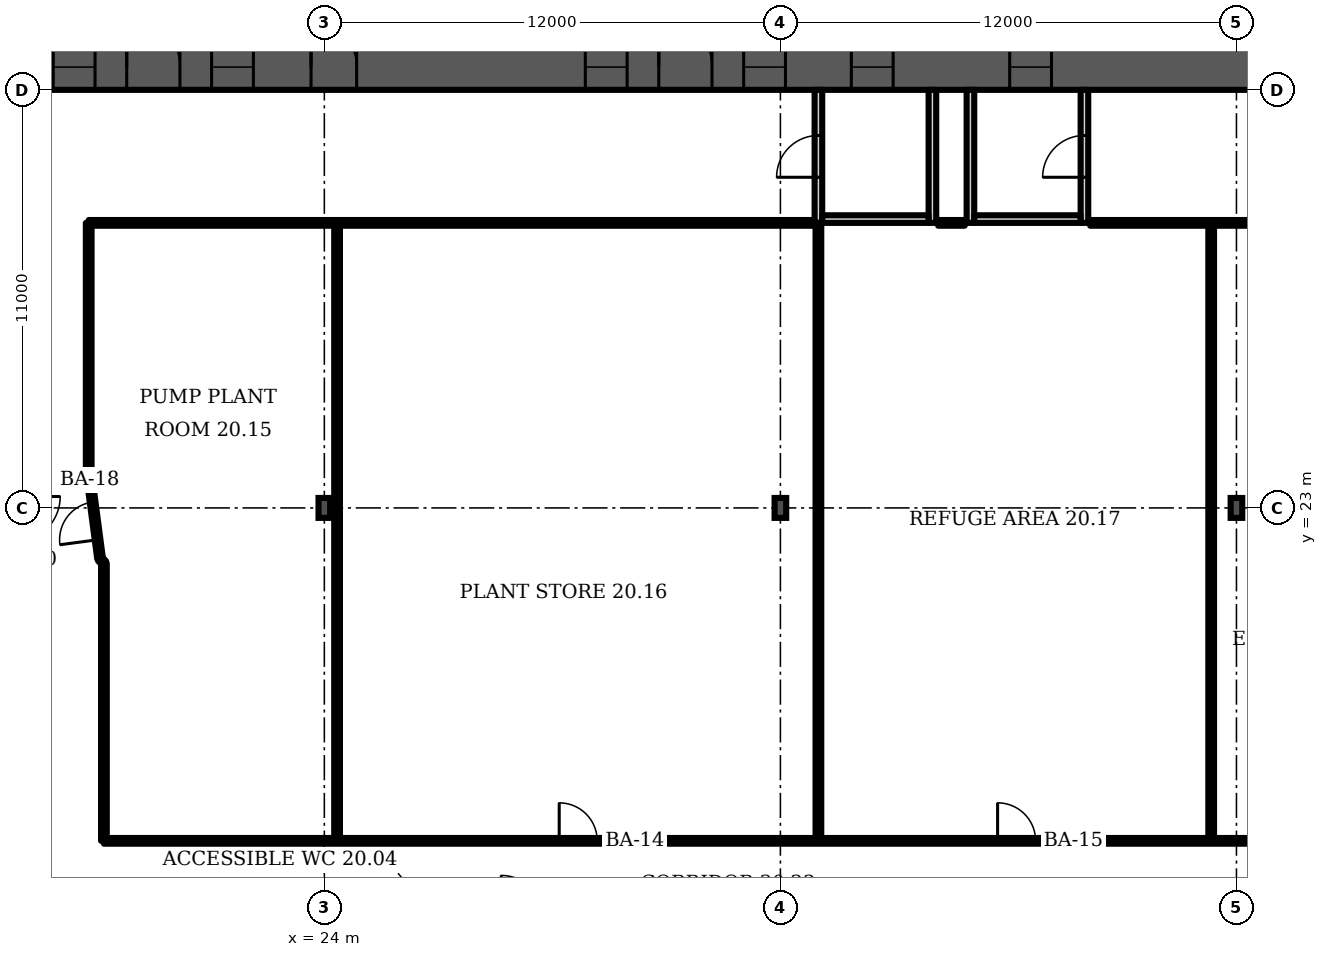
"""IFC4 building model, lengths in metres.
Left out: names, types, materials, properties, quantities, classifications, styles, units other than length and angle.
Written with IfcOpenShell. Run it as: python <this file> out.ifc"""

import sys

from ifc_helpers import new_model, si_unit, direction, frame, frame_2d, origin, origin_2d, place, context, subcontext, project, spatial, rectangle, i_section, extrude, element, fill, save


model = new_model("IFC4")
c1 = context("Model", 3, precision=1e-05, world=origin(), true_north=direction((0.0, 1.0)))
c2 = subcontext(c1, "Body", "Model", "MODEL_VIEW")
j1 = project(units=[si_unit("LENGTHUNIT", "METRE"), si_unit("PLANEANGLEUNIT", "RADIAN")], contexts=[c1])
p1 = place(None, origin())
s1 = spatial("IfcSite", under=j1, at=p1, CompositionType="ELEMENT")
p2 = place(p1, origin())
s2 = spatial("IfcBuilding", under=s1, at=p2, CompositionType="ELEMENT")
p3 = place(p2, frame((0.0, 0.0, 91.9)))
s3 = spatial("IfcBuildingStorey", under=s2, at=p3, CompositionType="ELEMENT", Elevation=91.9)
p4 = place(p3, frame((9.0, 34.6, 0.0), z_axis=(0.0, 0.0, 1.0), x_axis=(1.0, 0.0, 0.0)))
e1 = element("IfcWall", 1, at=p4, inside=s3, PredefinedType="SHEAR", context=c2, shape_type="SweptSolid", body=[
    extrude(rectangle(XDim=56.0, YDim=1.2, at=frame_2d((28.0, 0.0))), origin(), (0.0, 0.0, 1.0), 4.8),
])
p5 = place(p4, frame((3.3, 0.0, 0.0)))
e2 = element("IfcOpeningElement", 2, at=p5, cuts=e1, PredefinedType="OPENING", context=c2, shape_type="SweptSolid", body=[
    extrude(rectangle(XDim=1.0, YDim=2.1, at=frame_2d((0.5, 1.05))), frame((0.0, 0.61, 0.0), z_axis=(0.0, -1.0, 0.0), x_axis=(1.0, 0.0, 0.0)), (0.0, 0.0, 1.0), 1.22),
])
p6 = place(p4, frame((7.867, 0.0, 0.0)))
e3 = element("IfcOpeningElement", 3, at=p6, cuts=e1, PredefinedType="OPENING", context=c2, shape_type="SweptSolid", body=[
    extrude(rectangle(XDim=1.1, YDim=2.1, at=frame_2d((0.55, 1.05))), frame((0.0, 0.61, 0.0), z_axis=(0.0, -1.0, 0.0), x_axis=(1.0, 0.0, 0.0)), (0.0, 0.0, 1.0), 1.22),
])
p7 = place(p4, frame((12.033, 0.0, 0.0)))
e4 = element("IfcOpeningElement", 4, at=p7, cuts=e1, PredefinedType="OPENING", context=c2, shape_type="SweptSolid", body=[
    extrude(rectangle(XDim=1.1, YDim=2.1, at=frame_2d((0.55, 1.05))), frame((0.0, 0.61, 0.0), z_axis=(0.0, -1.0, 0.0), x_axis=(1.0, 0.0, 0.0)), (0.0, 0.0, 1.0), 1.22),
])
p8 = place(p4, frame((9.8, 0.0, 0.0)))
e5 = element("IfcOpeningElement", 5, at=p8, cuts=e1, PredefinedType="OPENING", context=c2, shape_type="SweptSolid", body=[
    extrude(rectangle(XDim=1.4, YDim=2.1, at=frame_2d((0.7, 1.05))), frame((0.0, 0.61, 0.0), z_axis=(0.0, -1.0, 0.0), x_axis=(1.0, 0.0, 0.0)), (0.0, 0.0, 1.0), 1.22),
])
p9 = place(p4, frame((14.65, 0.0, 0.0)))
e6 = element("IfcOpeningElement", 6, at=p9, cuts=e1, PredefinedType="OPENING", context=c2, shape_type="SweptSolid", body=[
    extrude(rectangle(XDim=1.2, YDim=2.1, at=frame_2d((0.6, 1.05))), frame((0.0, 0.61, 0.0), z_axis=(0.0, -1.0, 0.0), x_axis=(1.0, 0.0, 0.0)), (0.0, 0.0, 1.0), 1.22),
])
p10 = place(p4, frame((21.867, 0.0, 0.0)))
e7 = element("IfcOpeningElement", 7, at=p10, cuts=e1, PredefinedType="OPENING", context=c2, shape_type="SweptSolid", body=[
    extrude(rectangle(XDim=1.1, YDim=2.1, at=frame_2d((0.55, 1.05))), frame((0.0, 0.61, 0.0), z_axis=(0.0, -1.0, 0.0), x_axis=(1.0, 0.0, 0.0)), (0.0, 0.0, 1.0), 1.22),
])
p11 = place(p4, frame((26.033, 0.0, 0.0)))
e8 = element("IfcOpeningElement", 8, at=p11, cuts=e1, PredefinedType="OPENING", context=c2, shape_type="SweptSolid", body=[
    extrude(rectangle(XDim=1.1, YDim=2.1, at=frame_2d((0.55, 1.05))), frame((0.0, 0.61, 0.0), z_axis=(0.0, -1.0, 0.0), x_axis=(1.0, 0.0, 0.0)), (0.0, 0.0, 1.0), 1.22),
])
p12 = place(p4, frame((23.8, 0.0, 0.0)))
e9 = element("IfcOpeningElement", 9, at=p12, cuts=e1, PredefinedType="OPENING", context=c2, shape_type="SweptSolid", body=[
    extrude(rectangle(XDim=1.4, YDim=2.1, at=frame_2d((0.7, 1.05))), frame((0.0, 0.61, 0.0), z_axis=(0.0, -1.0, 0.0), x_axis=(1.0, 0.0, 0.0)), (0.0, 0.0, 1.0), 1.22),
])
p13 = place(p4, frame((28.867, 0.0, 0.0)))
e10 = element("IfcOpeningElement", 10, at=p13, cuts=e1, PredefinedType="OPENING", context=c2, shape_type="SweptSolid", body=[
    extrude(rectangle(XDim=1.1, YDim=2.1, at=frame_2d((0.55, 1.05))), frame((0.0, 0.61, 0.0), z_axis=(0.0, -1.0, 0.0), x_axis=(1.0, 0.0, 0.0)), (0.0, 0.0, 1.0), 1.22),
])
p14 = place(p4, frame((33.033, 0.0, 0.0)))
e11 = element("IfcOpeningElement", 11, at=p14, cuts=e1, PredefinedType="OPENING", context=c2, shape_type="SweptSolid", body=[
    extrude(rectangle(XDim=1.1, YDim=2.1, at=frame_2d((0.55, 1.05))), frame((0.0, 0.61, 0.0), z_axis=(0.0, -1.0, 0.0), x_axis=(1.0, 0.0, 0.0)), (0.0, 0.0, 1.0), 1.22),
])
p15 = place(p4, frame((40.15, 0.0, 0.0)))
e12 = element("IfcOpeningElement", 12, at=p15, cuts=e1, PredefinedType="OPENING", context=c2, shape_type="SweptSolid", body=[
    extrude(rectangle(XDim=1.2, YDim=2.1, at=frame_2d((0.6, 1.05))), frame((0.0, 0.61, 0.0), z_axis=(0.0, -1.0, 0.0), x_axis=(1.0, 0.0, 0.0)), (0.0, 0.0, 1.0), 1.22),
])
p16 = place(p4, frame((44.8, 0.0, 0.0)))
e13 = element("IfcOpeningElement", 13, at=p16, cuts=e1, PredefinedType="OPENING", context=c2, shape_type="SweptSolid", body=[
    extrude(rectangle(XDim=1.4, YDim=2.1, at=frame_2d((0.7, 1.05))), frame((0.0, 0.61, 0.0), z_axis=(0.0, -1.0, 0.0), x_axis=(1.0, 0.0, 0.0)), (0.0, 0.0, 1.0), 1.22),
])
p17 = place(p4, frame((49.867, 0.0, 0.0)))
e14 = element("IfcOpeningElement", 14, at=p17, cuts=e1, PredefinedType="OPENING", context=c2, shape_type="SweptSolid", body=[
    extrude(rectangle(XDim=1.1, YDim=2.1, at=frame_2d((0.55, 1.05))), frame((0.0, 0.61, 0.0), z_axis=(0.0, -1.0, 0.0), x_axis=(1.0, 0.0, 0.0)), (0.0, 0.0, 1.0), 1.22),
])
p18 = place(p4, frame((53.5, 0.0, 0.0)))
e15 = element("IfcOpeningElement", 15, at=p18, cuts=e1, PredefinedType="OPENING", context=c2, shape_type="SweptSolid", body=[
    extrude(rectangle(XDim=1.1, YDim=2.1, at=frame_2d((0.55, 1.05))), frame((0.0, 0.61, 0.0), z_axis=(0.0, -1.0, 0.0), x_axis=(1.0, 0.0, 0.0)), (0.0, 0.0, 1.0), 1.22),
])
p19 = place(p4, frame((51.567, 0.0, 0.0)))
e16 = element("IfcOpeningElement", 16, at=p19, cuts=e1, PredefinedType="OPENING", context=c2, shape_type="SweptSolid", body=[
    extrude(rectangle(XDim=1.4, YDim=2.1, at=frame_2d((0.7, 1.05))), frame((0.0, 0.61, 0.0), z_axis=(0.0, -1.0, 0.0), x_axis=(1.0, 0.0, 0.0)), (0.0, 0.0, 1.0), 1.22),
])
for number, where, z_axis, x_axis in (
    (17, (24.0, 23.0, 0.0), (0.0, 0.0, 1.0), (1.0, 0.0, 0.0)),
    (18, (36.0, 23.0, 0.0), (0.0, 0.0, 1.0), (1.0, 0.0, 0.0)),
    (19, (48.0, 23.0, 0.0), (0.0, 0.0, 1.0), (1.0, 0.0, 0.0)),
):
    element("IfcColumn", number, at=place(p3, frame(where, z_axis=z_axis, x_axis=x_axis)), inside=s3, PredefinedType="COLUMN", context=c2, shape_type="SweptSolid", body=[
        extrude(i_section(OverallWidth=0.306, OverallDepth=0.524, WebThickness=0.021, FlangeThickness=0.04, FilletRadius=0.027, at=origin_2d()), origin(), (0.0, 0.0, 1.0), 4.8),
    ])
p20 = place(p3, frame((37.0, 30.5, 0.0), z_axis=(0.0, 0.0, 1.0), x_axis=(0.0, 1.0, 0.0)))
e20 = element("IfcWall", 20, at=p20, inside=s3, PredefinedType="PARTITIONING", context=c2, shape_type="SweptSolid", body=[
    extrude(rectangle(XDim=3.5, YDim=0.2, at=frame_2d((1.75, 0.0))), origin(), (0.0, 0.0, 1.0), 4.4),
])
p21 = place(p20, frame((1.2, 0.0, 0.0)))
e21 = element("IfcOpeningElement", 21, at=p21, cuts=e20, PredefinedType="OPENING", context=c2, shape_type="SweptSolid", body=[
    extrude(rectangle(XDim=1.1, YDim=2.1, at=frame_2d((0.55, 1.05))), frame((0.0, 0.11, 0.0), z_axis=(0.0, -1.0, 0.0), x_axis=(1.0, 0.0, 0.0)), (0.0, 0.0, 1.0), 0.22),
])
p22 = place(p3, frame((40.0, 30.5, 0.0), z_axis=(0.0, 0.0, 1.0), x_axis=(0.0, 1.0, 0.0)))
e22 = element("IfcWall", 22, at=p22, inside=s3, PredefinedType="PARTITIONING", context=c2, shape_type="SweptSolid", body=[
    extrude(rectangle(XDim=3.5, YDim=0.2, at=frame_2d((1.75, 0.0))), origin(), (0.0, 0.0, 1.0), 4.4),
])
p23 = place(p3, frame((37.1, 30.6, 0.0), z_axis=(0.0, 0.0, 1.0), x_axis=(1.0, 0.0, 0.0)))
e23 = element("IfcWall", 23, at=p23, inside=s3, PredefinedType="PARTITIONING", context=c2, shape_type="SweptSolid", body=[
    extrude(rectangle(XDim=2.8, YDim=0.2, at=frame_2d((1.4, 0.0))), origin(), (0.0, 0.0, 1.0), 4.4),
])
p24 = place(p3, frame((41.0, 30.5, 0.0), z_axis=(0.0, 0.0, 1.0), x_axis=(0.0, 1.0, 0.0)))
e24 = element("IfcWall", 24, at=p24, inside=s3, PredefinedType="PARTITIONING", context=c2, shape_type="SweptSolid", body=[
    extrude(rectangle(XDim=3.5, YDim=0.2, at=frame_2d((1.75, 0.0))), origin(), (0.0, 0.0, 1.0), 4.4),
])
p25 = place(p3, frame((44.0, 30.5, 0.0), z_axis=(0.0, 0.0, 1.0), x_axis=(0.0, 1.0, 0.0)))
e25 = element("IfcWall", 25, at=p25, inside=s3, PredefinedType="PARTITIONING", context=c2, shape_type="SweptSolid", body=[
    extrude(rectangle(XDim=3.5, YDim=0.2, at=frame_2d((1.75, 0.0))), origin(), (0.0, 0.0, 1.0), 4.4),
])
p26 = place(p25, frame((1.2, 0.0, 0.0)))
e26 = element("IfcOpeningElement", 26, at=p26, cuts=e25, PredefinedType="OPENING", context=c2, shape_type="SweptSolid", body=[
    extrude(rectangle(XDim=1.1, YDim=2.1, at=frame_2d((0.55, 1.05))), frame((0.0, 0.11, 0.0), z_axis=(0.0, -1.0, 0.0), x_axis=(1.0, 0.0, 0.0)), (0.0, 0.0, 1.0), 0.22),
])
p27 = place(p3, frame((41.1, 30.6, 0.0), z_axis=(0.0, 0.0, 1.0), x_axis=(1.0, 0.0, 0.0)))
e27 = element("IfcWall", 27, at=p27, inside=s3, PredefinedType="PARTITIONING", context=c2, shape_type="SweptSolid", body=[
    extrude(rectangle(XDim=2.8, YDim=0.2, at=frame_2d((1.4, 0.0))), origin(), (0.0, 0.0, 1.0), 4.4),
])
p28 = place(p3, frame((17.8, 23.935, 0.0), z_axis=(0.0, 0.0, 1.0), x_axis=(0.0, 1.0, 0.0)))
e28 = element("IfcWall", 28, at=p28, inside=s3, PredefinedType="PARTITIONING", context=c2, shape_type="SweptSolid", body=[
    extrude(rectangle(XDim=6.565, YDim=0.15, at=frame_2d((3.282, 0.0))), origin(), (0.0, 0.0, 1.0), 4.4),
])
p29 = place(p3, frame((17.8, 30.5, 0.0), z_axis=(0.0, 0.0, 1.0), x_axis=(1.0, 0.0, 0.0)))
e29 = element("IfcWall", 29, at=p29, inside=s3, PredefinedType="PARTITIONING", context=c2, shape_type="SweptSolid", body=[
    extrude(rectangle(XDim=19.05, YDim=0.15, at=frame_2d((9.525, 0.0))), origin(), (0.0, 0.0, 1.0), 4.4),
])
p30 = place(p3, frame((18.1, 21.66, 0.0), z_axis=(0.0, 0.0, 1.0), x_axis=(-0.130749, 0.991416, 0.0)))
e30 = element("IfcWall", 30, at=p30, inside=s3, PredefinedType="PARTITIONING", context=c2, shape_type="SweptSolid", body=[
    extrude(rectangle(XDim=2.295, YDim=0.15, at=frame_2d((1.147, 0.0))), origin(), (0.0, 0.0, 1.0), 4.4),
])
p31 = place(p30, frame((0.506, 0.0, 0.0)))
e31 = element("IfcOpeningElement", 31, at=p31, cuts=e30, PredefinedType="OPENING", context=c2, shape_type="SweptSolid", body=[
    extrude(rectangle(XDim=1.0, YDim=2.1, at=frame_2d((0.5, 1.05))), frame((0.0, 0.085, 0.0), z_axis=(0.0, -1.0, 0.0), x_axis=(1.0, 0.0, 0.0)), (0.0, 0.0, 1.0), 0.17),
])
p32 = place(p3, frame((18.2, 14.24, 0.0), z_axis=(0.0, 0.0, 1.0), x_axis=(0.0, 1.0, 0.0)))
e32 = element("IfcWall", 32, at=p32, inside=s3, PredefinedType="PARTITIONING", context=c2, shape_type="SweptSolid", body=[
    extrude(rectangle(XDim=7.31, YDim=0.15, at=frame_2d((3.655, 0.0))), origin(), (0.0, 0.0, 1.0), 4.4),
])
p33 = place(p3, frame((18.2, 14.24, 0.0), z_axis=(0.0, 0.0, 1.0), x_axis=(1.0, 0.0, 0.0)))
e33 = element("IfcWall", 33, at=p33, inside=s3, PredefinedType="PARTITIONING", context=c2, shape_type="SweptSolid", body=[
    extrude(rectangle(XDim=67.735, YDim=0.15, at=frame_2d((33.868, 0.0))), origin(), (0.0, 0.0, 1.0), 4.4),
])
p34 = place(p33, frame((11.98, 0.0, 0.0)))
e34 = element("IfcOpeningElement", 34, at=p34, cuts=e33, PredefinedType="OPENING", context=c2, shape_type="SweptSolid", body=[
    extrude(rectangle(XDim=1.0, YDim=2.1, at=frame_2d((0.5, 1.05))), frame((0.0, 0.085, 0.0), z_axis=(0.0, -1.0, 0.0), x_axis=(1.0, 0.0, 0.0)), (0.0, 0.0, 1.0), 0.17),
])
p35 = place(p33, frame((23.515, 0.0, 0.0)))
e35 = element("IfcOpeningElement", 35, at=p35, cuts=e33, PredefinedType="OPENING", context=c2, shape_type="SweptSolid", body=[
    extrude(rectangle(XDim=1.0, YDim=2.1, at=frame_2d((0.5, 1.05))), frame((0.0, 0.085, 0.0), z_axis=(0.0, -1.0, 0.0), x_axis=(1.0, 0.0, 0.0)), (0.0, 0.0, 1.0), 0.17),
])
p36 = place(p33, frame((59.045, 0.0, 0.0)))
e36 = element("IfcOpeningElement", 36, at=p36, cuts=e33, PredefinedType="OPENING", context=c2, shape_type="SweptSolid", body=[
    extrude(rectangle(XDim=1.0, YDim=2.1, at=frame_2d((0.5, 1.05))), frame((0.0, 0.085, 0.0), z_axis=(0.0, -1.0, 0.0), x_axis=(1.0, 0.0, 0.0)), (0.0, 0.0, 1.0), 0.17),
])
p37 = place(p33, frame((65.035, 0.0, 0.0)))
e37 = element("IfcOpeningElement", 37, at=p37, cuts=e33, PredefinedType="OPENING", context=c2, shape_type="SweptSolid", body=[
    extrude(rectangle(XDim=1.0, YDim=2.1, at=frame_2d((0.5, 1.05))), frame((0.0, 0.085, 0.0), z_axis=(0.0, -1.0, 0.0), x_axis=(1.0, 0.0, 0.0)), (0.0, 0.0, 1.0), 0.17),
])
p38 = place(p3, frame((18.2, 21.55, 0.0), z_axis=(0.0, 0.0, 1.0), x_axis=(-0.672587, 0.74001, 0.0)))
e38 = element("IfcWall", 38, at=p38, inside=s3, PredefinedType="PARTITIONING", context=c2, shape_type="SweptSolid", body=[
    extrude(rectangle(XDim=0.148, YDim=0.15, at=frame_2d((0.074, 0.0))), origin(), (0.0, 0.0, 1.0), 4.4),
])
for number, where, z_axis, x_axis in (
    (39, (24.335, 14.24, 0.0), (0.0, 0.0, 1.0), (0.0, 1.0, 0.0)),
    (40, (37.0, 14.24, 0.0), (0.0, 0.0, 1.0), (0.0, 1.0, 0.0)),
    (41, (47.335, 14.24, 0.0), (0.0, 0.0, 1.0), (0.0, 1.0, 0.0)),
):
    element("IfcWall", number, at=place(p3, frame(where, z_axis=z_axis, x_axis=x_axis)), inside=s3, PredefinedType="PARTITIONING", context=c2, shape_type="SweptSolid", body=[
        extrude(rectangle(XDim=16.26, YDim=0.15, at=frame_2d((8.13, 0.0))), origin(), (0.0, 0.0, 1.0), 4.4),
    ])
p39 = place(p3, frame((40.15, 30.5, 0.0), z_axis=(0.0, 0.0, 1.0), x_axis=(1.0, 0.0, 0.0)))
e42 = element("IfcWall", 42, at=p39, inside=s3, PredefinedType="PARTITIONING", context=c2, shape_type="SweptSolid", body=[
    extrude(rectangle(XDim=0.7, YDim=0.15, at=frame_2d((0.35, 0.0))), origin(), (0.0, 0.0, 1.0), 4.4),
])
p40 = place(p3, frame((44.15, 30.5, 0.0), z_axis=(0.0, 0.0, 1.0), x_axis=(1.0, 0.0, 0.0)))
e43 = element("IfcWall", 43, at=p40, inside=s3, PredefinedType="PARTITIONING", context=c2, shape_type="SweptSolid", body=[
    extrude(rectangle(XDim=19.425, YDim=0.15, at=frame_2d((9.712, 0.0))), origin(), (0.0, 0.0, 1.0), 4.4),
])
p41 = place(p40, frame((7.805, 0.0, 0.0)))
e44 = element("IfcOpeningElement", 44, at=p41, cuts=e43, PredefinedType="OPENING", context=c2, shape_type="SweptSolid", body=[
    extrude(rectangle(XDim=1.0, YDim=2.1, at=frame_2d((0.5, 1.05))), frame((0.0, 0.085, 0.0), z_axis=(0.0, -1.0, 0.0), x_axis=(1.0, 0.0, 0.0)), (0.0, 0.0, 1.0), 0.17),
])
p42 = place(p40, frame((17.34, 0.0, 0.0)))
e45 = element("IfcOpeningElement", 45, at=p42, cuts=e43, PredefinedType="OPENING", context=c2, shape_type="SweptSolid", body=[
    extrude(rectangle(XDim=1.0, YDim=2.1, at=frame_2d((0.5, 1.05))), frame((0.0, 0.085, 0.0), z_axis=(0.0, -1.0, 0.0), x_axis=(1.0, 0.0, 0.0)), (0.0, 0.0, 1.0), 0.17),
])
p43 = place(p6, origin())
e46 = element("IfcDoor", 46, at=p43, inside=s3, OperationType="DOUBLE_DOOR_SLIDING", PredefinedType="DOOR", context=c2, shape_type="SweptSolid", body=[
    extrude(rectangle(XDim=1.1, YDim=2.1, at=frame_2d((0.55, 1.05))), frame((0.0, 0.025, 0.0), z_axis=(0.0, -1.0, 0.0), x_axis=(1.0, 0.0, 0.0)), (0.0, 0.0, 1.0), 0.05),
])
fill(e3, e46)
p44 = place(p7, origin())
e47 = element("IfcDoor", 47, at=p44, inside=s3, OperationType="DOUBLE_DOOR_SLIDING", PredefinedType="DOOR", context=c2, shape_type="SweptSolid", body=[
    extrude(rectangle(XDim=1.1, YDim=2.1, at=frame_2d((0.55, 1.05))), frame((0.0, 0.025, 0.0), z_axis=(0.0, -1.0, 0.0), x_axis=(1.0, 0.0, 0.0)), (0.0, 0.0, 1.0), 0.05),
])
fill(e4, e47)
p45 = place(p8, origin())
e48 = element("IfcDoor", 48, at=p45, inside=s3, OperationType="DOUBLE_DOOR_SINGLE_SWING", PredefinedType="DOOR", context=c2, shape_type="SweptSolid", body=[
    extrude(rectangle(XDim=1.4, YDim=2.1, at=frame_2d((0.7, 1.05))), frame((0.0, 0.025, 0.0), z_axis=(0.0, -1.0, 0.0), x_axis=(1.0, 0.0, 0.0)), (0.0, 0.0, 1.0), 0.05),
])
fill(e5, e48)
p46 = place(p9, origin())
e49 = element("IfcDoor", 49, at=p46, inside=s3, OperationType="SINGLE_SWING_LEFT", PredefinedType="DOOR", context=c2, shape_type="SweptSolid", body=[
    extrude(rectangle(XDim=1.2, YDim=2.1, at=frame_2d((0.6, 1.05))), frame((0.0, 0.025, 0.0), z_axis=(0.0, -1.0, 0.0), x_axis=(1.0, 0.0, 0.0)), (0.0, 0.0, 1.0), 0.05),
])
fill(e6, e49)
p47 = place(p10, origin())
e50 = element("IfcDoor", 50, at=p47, inside=s3, OperationType="DOUBLE_DOOR_SLIDING", PredefinedType="DOOR", context=c2, shape_type="SweptSolid", body=[
    extrude(rectangle(XDim=1.1, YDim=2.1, at=frame_2d((0.55, 1.05))), frame((0.0, 0.025, 0.0), z_axis=(0.0, -1.0, 0.0), x_axis=(1.0, 0.0, 0.0)), (0.0, 0.0, 1.0), 0.05),
])
fill(e7, e50)
p48 = place(p11, origin())
e51 = element("IfcDoor", 51, at=p48, inside=s3, OperationType="DOUBLE_DOOR_SLIDING", PredefinedType="DOOR", context=c2, shape_type="SweptSolid", body=[
    extrude(rectangle(XDim=1.1, YDim=2.1, at=frame_2d((0.55, 1.05))), frame((0.0, 0.025, 0.0), z_axis=(0.0, -1.0, 0.0), x_axis=(1.0, 0.0, 0.0)), (0.0, 0.0, 1.0), 0.05),
])
fill(e8, e51)
p49 = place(p12, origin())
e52 = element("IfcDoor", 52, at=p49, inside=s3, OperationType="DOUBLE_DOOR_SINGLE_SWING", PredefinedType="DOOR", context=c2, shape_type="SweptSolid", body=[
    extrude(rectangle(XDim=1.4, YDim=2.1, at=frame_2d((0.7, 1.05))), frame((0.0, 0.025, 0.0), z_axis=(0.0, -1.0, 0.0), x_axis=(1.0, 0.0, 0.0)), (0.0, 0.0, 1.0), 0.05),
])
fill(e9, e52)
p50 = place(p13, origin())
e53 = element("IfcDoor", 53, at=p50, inside=s3, OperationType="DOUBLE_DOOR_SLIDING", PredefinedType="DOOR", context=c2, shape_type="SweptSolid", body=[
    extrude(rectangle(XDim=1.1, YDim=2.1, at=frame_2d((0.55, 1.05))), frame((0.0, 0.025, 0.0), z_axis=(0.0, -1.0, 0.0), x_axis=(1.0, 0.0, 0.0)), (0.0, 0.0, 1.0), 0.05),
])
fill(e10, e53)
p51 = place(p14, origin())
e54 = element("IfcDoor", 54, at=p51, inside=s3, OperationType="DOUBLE_DOOR_SLIDING", PredefinedType="DOOR", context=c2, shape_type="SweptSolid", body=[
    extrude(rectangle(XDim=1.1, YDim=2.1, at=frame_2d((0.55, 1.05))), frame((0.0, 0.025, 0.0), z_axis=(0.0, -1.0, 0.0), x_axis=(1.0, 0.0, 0.0)), (0.0, 0.0, 1.0), 0.05),
])
fill(e11, e54)
p52 = place(p21, origin())
e55 = element("IfcDoor", 55, at=p52, inside=s3, OperationType="SINGLE_SWING_LEFT", PredefinedType="DOOR", context=c2, shape_type="SweptSolid", body=[
    extrude(rectangle(XDim=1.1, YDim=2.1, at=frame_2d((0.55, 1.05))), frame((0.0, 0.025, 0.0), z_axis=(0.0, -1.0, 0.0), x_axis=(1.0, 0.0, 0.0)), (0.0, 0.0, 1.0), 0.05),
])
fill(e21, e55)
p53 = place(p26, origin())
e56 = element("IfcDoor", 56, at=p53, inside=s3, OperationType="SINGLE_SWING_LEFT", PredefinedType="DOOR", context=c2, shape_type="SweptSolid", body=[
    extrude(rectangle(XDim=1.1, YDim=2.1, at=frame_2d((0.55, 1.05))), frame((0.0, 0.025, 0.0), z_axis=(0.0, -1.0, 0.0), x_axis=(1.0, 0.0, 0.0)), (0.0, 0.0, 1.0), 0.05),
])
fill(e26, e56)
p54 = place(p34, origin())
e57 = element("IfcDoor", 57, at=p54, inside=s3, OperationType="SINGLE_SWING_LEFT", PredefinedType="DOOR", context=c2, shape_type="SweptSolid", body=[
    extrude(rectangle(XDim=1.0, YDim=2.1, at=frame_2d((0.5, 1.05))), frame((0.0, 0.025, 0.0), z_axis=(0.0, -1.0, 0.0), x_axis=(1.0, 0.0, 0.0)), (0.0, 0.0, 1.0), 0.05),
])
fill(e34, e57)
p55 = place(p35, origin())
e58 = element("IfcDoor", 58, at=p55, inside=s3, OperationType="SINGLE_SWING_LEFT", PredefinedType="DOOR", context=c2, shape_type="SweptSolid", body=[
    extrude(rectangle(XDim=1.0, YDim=2.1, at=frame_2d((0.5, 1.05))), frame((0.0, 0.025, 0.0), z_axis=(0.0, -1.0, 0.0), x_axis=(1.0, 0.0, 0.0)), (0.0, 0.0, 1.0), 0.05),
])
fill(e35, e58)
p56 = place(p31, origin())
e59 = element("IfcDoor", 59, at=p56, inside=s3, OperationType="SINGLE_SWING_LEFT", PredefinedType="DOOR", context=c2, shape_type="SweptSolid", body=[
    extrude(rectangle(XDim=1.0, YDim=2.1, at=frame_2d((0.5, 1.05))), frame((0.0, 0.025, 0.0), z_axis=(0.0, -1.0, 0.0), x_axis=(1.0, 0.0, 0.0)), (0.0, 0.0, 1.0), 0.05),
])
fill(e31, e59)
save(model, sys.argv[1])
